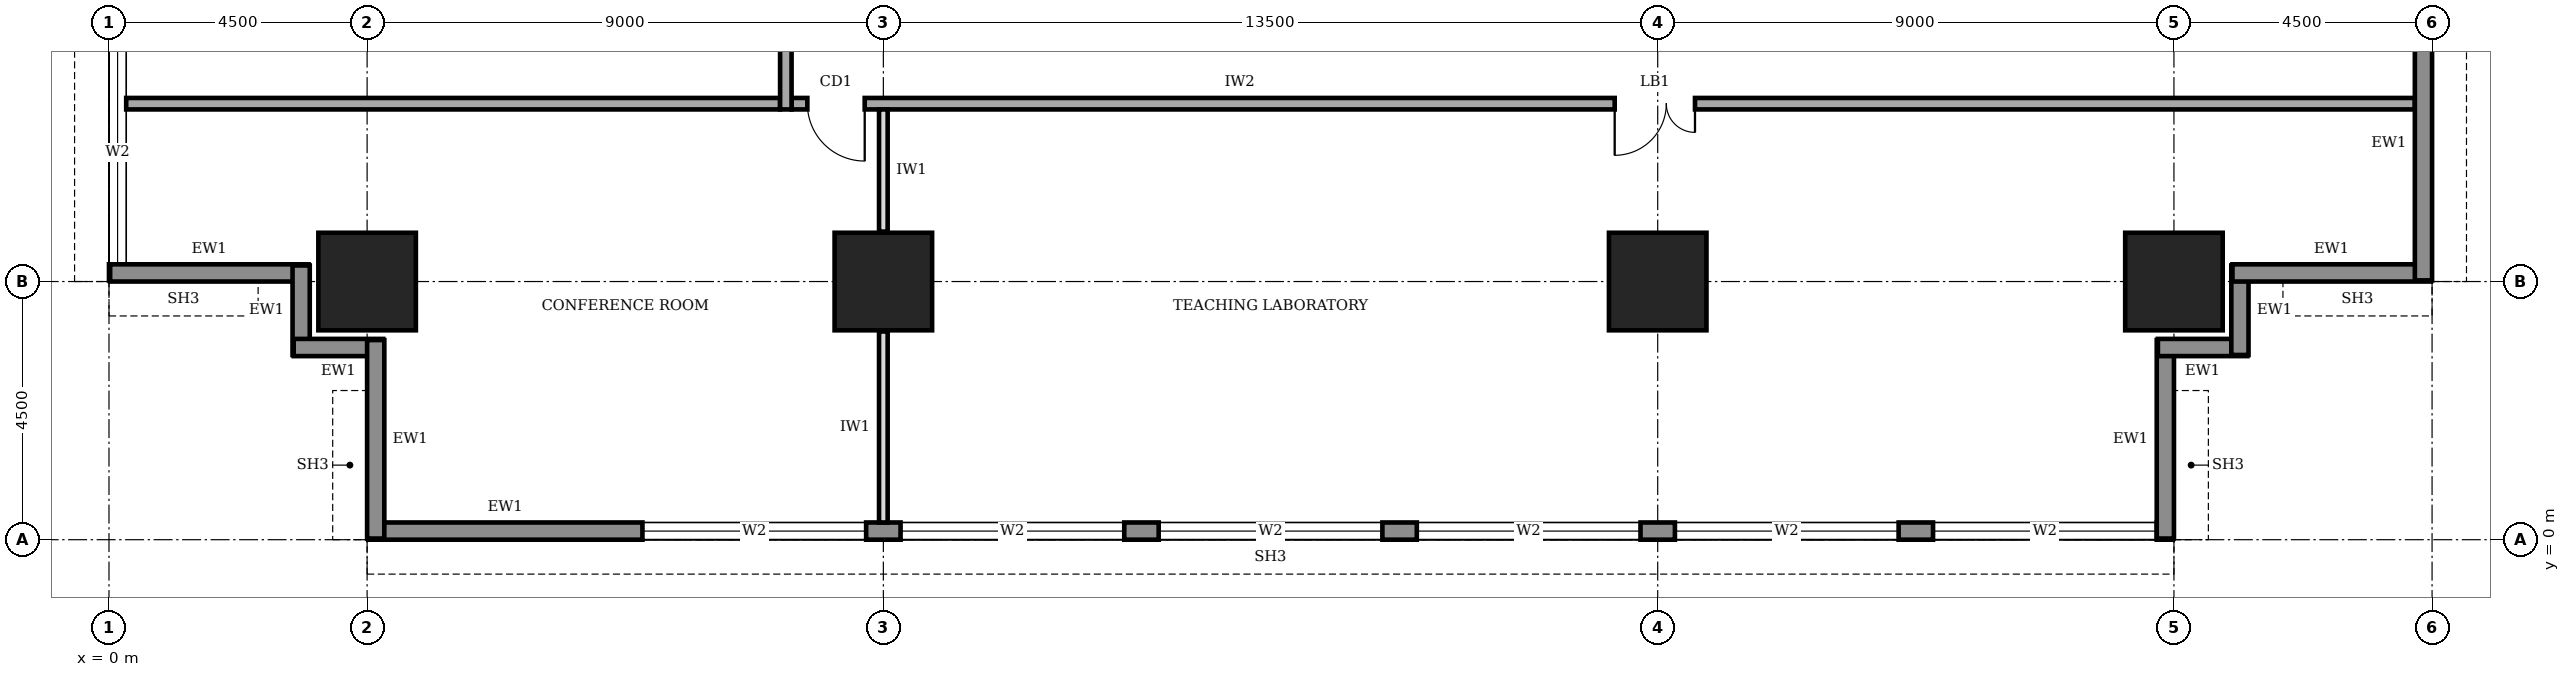
"""IFC4 building model, lengths in metres.
Left out: names, types, materials, properties, quantities, classifications, styles, units other than length and angle.
Written with IfcOpenShell. Run it as: python <this file> out.ifc"""

import sys

from ifc_helpers import new_model, si_unit, direction, frame, frame_2d, origin, origin_2d, place, context, subcontext, project, spatial, rectangle, extrude, element, fill, save


model = new_model("IFC4")
c1 = context("Model", 3, precision=1e-05, world=origin(), true_north=direction((0.0, 1.0)))
c2 = subcontext(c1, "Body", "Model", "MODEL_VIEW")
j1 = project(units=[si_unit("LENGTHUNIT", "METRE"), si_unit("PLANEANGLEUNIT", "RADIAN")], contexts=[c1])
p1 = place(None, origin())
s1 = spatial("IfcSite", under=j1, at=p1, CompositionType="ELEMENT")
p2 = place(p1, origin())
s2 = spatial("IfcBuilding", under=s1, at=p2, CompositionType="ELEMENT")
p3 = place(p2, frame((0.0, 0.0, 153.0)))
s3 = spatial("IfcBuildingStorey", under=s2, at=p3, CompositionType="ELEMENT", Elevation=153.0)
for number, where, z_axis, x_axis in (
    (1, (4.5, 4.5, 0.0), (0.0, 0.0, 1.0), (1.0, 0.0, 0.0)),
    (2, (13.5, 4.5, 0.0), (0.0, 0.0, 1.0), (1.0, 0.0, 0.0)),
    (3, (27.0, 4.5, 0.0), (0.0, 0.0, 1.0), (1.0, 0.0, 0.0)),
    (4, (36.0, 4.5, 0.0), (0.0, 0.0, 1.0), (1.0, 0.0, 0.0)),
):
    element("IfcColumn", number, at=place(p3, frame(where, z_axis=z_axis, x_axis=x_axis)), inside=s3, PredefinedType="COLUMN", context=c2, shape_type="SweptSolid", body=[
        extrude(rectangle(XDim=1.7, YDim=1.7, at=origin_2d()), origin(), (0.0, 0.0, 1.0), 4.0),
    ])
p4 = place(p3, frame((4.52, 0.15, 0.0), z_axis=(0.0, 0.0, 1.0), x_axis=(1.0, 0.0, 0.0)))
e5 = element("IfcWall", 5, at=p4, inside=s3, PredefinedType="STANDARD", context=c2, shape_type="SweptSolid", body=[
    extrude(rectangle(XDim=31.46, YDim=0.3, at=frame_2d((15.73, 0.0))), origin(), (0.0, 0.0, 1.0), 3.75),
])
p5 = place(p4, frame((4.78, 0.0, 0.6)))
e6 = element("IfcOpeningElement", 6, at=p5, cuts=e5, PredefinedType="OPENING", context=c2, shape_type="SweptSolid", body=[
    extrude(rectangle(XDim=3.9, YDim=2.6, at=frame_2d((1.95, 1.3))), frame((0.0, 0.16, 0.0), z_axis=(0.0, -1.0, 0.0), x_axis=(1.0, 0.0, 0.0)), (0.0, 0.0, 1.0), 0.32),
])
p6 = place(p4, frame((9.28, 0.0, 0.6)))
e7 = element("IfcOpeningElement", 7, at=p6, cuts=e5, PredefinedType="OPENING", context=c2, shape_type="SweptSolid", body=[
    extrude(rectangle(XDim=3.9, YDim=2.6, at=frame_2d((1.95, 1.3))), frame((0.0, 0.16, 0.0), z_axis=(0.0, -1.0, 0.0), x_axis=(1.0, 0.0, 0.0)), (0.0, 0.0, 1.0), 0.32),
])
p7 = place(p4, frame((13.78, 0.0, 0.6)))
e8 = element("IfcOpeningElement", 8, at=p7, cuts=e5, PredefinedType="OPENING", context=c2, shape_type="SweptSolid", body=[
    extrude(rectangle(XDim=3.9, YDim=2.6, at=frame_2d((1.95, 1.3))), frame((0.0, 0.16, 0.0), z_axis=(0.0, -1.0, 0.0), x_axis=(1.0, 0.0, 0.0)), (0.0, 0.0, 1.0), 0.32),
])
p8 = place(p4, frame((18.28, 0.0, 0.6)))
e9 = element("IfcOpeningElement", 9, at=p8, cuts=e5, PredefinedType="OPENING", context=c2, shape_type="SweptSolid", body=[
    extrude(rectangle(XDim=3.9, YDim=2.6, at=frame_2d((1.95, 1.3))), frame((0.0, 0.16, 0.0), z_axis=(0.0, -1.0, 0.0), x_axis=(1.0, 0.0, 0.0)), (0.0, 0.0, 1.0), 0.32),
])
p9 = place(p4, frame((22.78, 0.0, 0.6)))
e10 = element("IfcOpeningElement", 10, at=p9, cuts=e5, PredefinedType="OPENING", context=c2, shape_type="SweptSolid", body=[
    extrude(rectangle(XDim=3.9, YDim=2.6, at=frame_2d((1.95, 1.3))), frame((0.0, 0.16, 0.0), z_axis=(0.0, -1.0, 0.0), x_axis=(1.0, 0.0, 0.0)), (0.0, 0.0, 1.0), 0.32),
])
p10 = place(p4, frame((27.28, 0.0, 0.6)))
e11 = element("IfcOpeningElement", 11, at=p10, cuts=e5, PredefinedType="OPENING", context=c2, shape_type="SweptSolid", body=[
    extrude(rectangle(XDim=3.9, YDim=2.6, at=frame_2d((1.95, 1.3))), frame((0.0, 0.16, 0.0), z_axis=(0.0, -1.0, 0.0), x_axis=(1.0, 0.0, 0.0)), (0.0, 0.0, 1.0), 0.32),
])
p11 = place(p3, frame((35.85, 0.02, 0.0), z_axis=(0.0, 0.0, 1.0), x_axis=(0.0, 1.0, 0.0)))
e12 = element("IfcWall", 12, at=p11, inside=s3, PredefinedType="STANDARD", context=c2, shape_type="SweptSolid", body=[
    extrude(rectangle(XDim=3.46, YDim=0.3, at=frame_2d((1.73, 0.0))), origin(), (0.0, 0.0, 1.0), 2.85),
])
for number, where, z_axis, x_axis in (
    (13, (35.72, 3.35, 0.0), (0.0, 0.0, 1.0), (1.0, 0.0, 0.0)),
    (14, (37.15, 3.22, 0.0), (0.0, 0.0, 1.0), (0.0, 1.0, 0.0)),
):
    element("IfcWall", number, at=place(p3, frame(where, z_axis=z_axis, x_axis=x_axis)), inside=s3, PredefinedType="STANDARD", context=c2, shape_type="SweptSolid", body=[
        extrude(rectangle(XDim=1.56, YDim=0.3, at=frame_2d((0.78, 0.0))), origin(), (0.0, 0.0, 1.0), 3.75),
    ])
p12 = place(p3, frame((37.02, 4.65, 0.0), z_axis=(0.0, 0.0, 1.0), x_axis=(1.0, 0.0, 0.0)))
e15 = element("IfcWall", 15, at=p12, inside=s3, PredefinedType="STANDARD", context=c2, shape_type="SweptSolid", body=[
    extrude(rectangle(XDim=3.46, YDim=0.3, at=frame_2d((1.73, 0.0))), origin(), (0.0, 0.0, 1.0), 2.85),
])
p13 = place(p3, frame((40.35, 4.52, 0.0), z_axis=(0.0, 0.0, 1.0), x_axis=(0.0, 1.0, 0.0)))
e16 = element("IfcWall", 16, at=p13, inside=s3, PredefinedType="STANDARD", context=c2, shape_type="SweptSolid", body=[
    extrude(rectangle(XDim=31.46, YDim=0.3, at=frame_2d((15.73, 0.0))), origin(), (0.0, 0.0, 1.0), 3.75),
])
p14 = place(p13, frame((4.78, 0.0, 0.6)))
e17 = element("IfcOpeningElement", 17, at=p14, cuts=e16, PredefinedType="OPENING", context=c2, shape_type="SweptSolid", body=[
    extrude(rectangle(XDim=3.9, YDim=2.6, at=frame_2d((1.95, 1.3))), frame((0.0, 0.16, 0.0), z_axis=(0.0, -1.0, 0.0), x_axis=(1.0, 0.0, 0.0)), (0.0, 0.0, 1.0), 0.32),
])
p15 = place(p13, frame((9.28, 0.0, 0.6)))
e18 = element("IfcOpeningElement", 18, at=p15, cuts=e16, PredefinedType="OPENING", context=c2, shape_type="SweptSolid", body=[
    extrude(rectangle(XDim=3.9, YDim=2.6, at=frame_2d((1.95, 1.3))), frame((0.0, 0.16, 0.0), z_axis=(0.0, -1.0, 0.0), x_axis=(1.0, 0.0, 0.0)), (0.0, 0.0, 1.0), 0.32),
])
p16 = place(p13, frame((13.78, 0.0, 0.6)))
e19 = element("IfcOpeningElement", 19, at=p16, cuts=e16, PredefinedType="OPENING", context=c2, shape_type="SweptSolid", body=[
    extrude(rectangle(XDim=3.9, YDim=2.6, at=frame_2d((1.95, 1.3))), frame((0.0, 0.16, 0.0), z_axis=(0.0, -1.0, 0.0), x_axis=(1.0, 0.0, 0.0)), (0.0, 0.0, 1.0), 0.32),
])
p17 = place(p13, frame((18.28, 0.0, 0.6)))
e20 = element("IfcOpeningElement", 20, at=p17, cuts=e16, PredefinedType="OPENING", context=c2, shape_type="SweptSolid", body=[
    extrude(rectangle(XDim=3.9, YDim=2.6, at=frame_2d((1.95, 1.3))), frame((0.0, 0.16, 0.0), z_axis=(0.0, -1.0, 0.0), x_axis=(1.0, 0.0, 0.0)), (0.0, 0.0, 1.0), 0.32),
])
p18 = place(p13, frame((22.78, 0.0, 0.6)))
e21 = element("IfcOpeningElement", 21, at=p18, cuts=e16, PredefinedType="OPENING", context=c2, shape_type="SweptSolid", body=[
    extrude(rectangle(XDim=3.9, YDim=2.6, at=frame_2d((1.95, 1.3))), frame((0.0, 0.16, 0.0), z_axis=(0.0, -1.0, 0.0), x_axis=(1.0, 0.0, 0.0)), (0.0, 0.0, 1.0), 0.32),
])
p19 = place(p13, frame((27.28, 0.0, 0.6)))
e22 = element("IfcOpeningElement", 22, at=p19, cuts=e16, PredefinedType="OPENING", context=c2, shape_type="SweptSolid", body=[
    extrude(rectangle(XDim=3.9, YDim=2.6, at=frame_2d((1.95, 1.3))), frame((0.0, 0.16, 0.0), z_axis=(0.0, -1.0, 0.0), x_axis=(1.0, 0.0, 0.0)), (0.0, 0.0, 1.0), 0.32),
])
p20 = place(p3, frame((0.15, 35.98, 0.0), z_axis=(0.0, 0.0, 1.0), x_axis=(0.0, -1.0, 0.0)))
e23 = element("IfcWall", 23, at=p20, inside=s3, PredefinedType="STANDARD", context=c2, shape_type="SweptSolid", body=[
    extrude(rectangle(XDim=31.46, YDim=0.3, at=frame_2d((15.73, 0.0))), origin(), (0.0, 0.0, 1.0), 3.75),
])
p21 = place(p20, frame((27.28, 0.0, 0.6)))
e24 = element("IfcOpeningElement", 24, at=p21, cuts=e23, PredefinedType="OPENING", context=c2, shape_type="SweptSolid", body=[
    extrude(rectangle(XDim=3.9, YDim=2.6, at=frame_2d((1.95, 1.3))), frame((0.0, 0.16, 0.0), z_axis=(0.0, -1.0, 0.0), x_axis=(1.0, 0.0, 0.0)), (0.0, 0.0, 1.0), 0.32),
])
p22 = place(p20, frame((22.78, 0.0, 0.6)))
e25 = element("IfcOpeningElement", 25, at=p22, cuts=e23, PredefinedType="OPENING", context=c2, shape_type="SweptSolid", body=[
    extrude(rectangle(XDim=3.9, YDim=2.6, at=frame_2d((1.95, 1.3))), frame((0.0, 0.16, 0.0), z_axis=(0.0, -1.0, 0.0), x_axis=(1.0, 0.0, 0.0)), (0.0, 0.0, 1.0), 0.32),
])
p23 = place(p20, frame((18.28, 0.0, 0.6)))
e26 = element("IfcOpeningElement", 26, at=p23, cuts=e23, PredefinedType="OPENING", context=c2, shape_type="SweptSolid", body=[
    extrude(rectangle(XDim=3.9, YDim=2.6, at=frame_2d((1.95, 1.3))), frame((0.0, 0.16, 0.0), z_axis=(0.0, -1.0, 0.0), x_axis=(1.0, 0.0, 0.0)), (0.0, 0.0, 1.0), 0.32),
])
p24 = place(p20, frame((13.78, 0.0, 0.6)))
e27 = element("IfcOpeningElement", 27, at=p24, cuts=e23, PredefinedType="OPENING", context=c2, shape_type="SweptSolid", body=[
    extrude(rectangle(XDim=3.9, YDim=2.6, at=frame_2d((1.95, 1.3))), frame((0.0, 0.16, 0.0), z_axis=(0.0, -1.0, 0.0), x_axis=(1.0, 0.0, 0.0)), (0.0, 0.0, 1.0), 0.32),
])
p25 = place(p20, frame((9.28, 0.0, 0.6)))
e28 = element("IfcOpeningElement", 28, at=p25, cuts=e23, PredefinedType="OPENING", context=c2, shape_type="SweptSolid", body=[
    extrude(rectangle(XDim=3.9, YDim=2.6, at=frame_2d((1.95, 1.3))), frame((0.0, 0.16, 0.0), z_axis=(0.0, -1.0, 0.0), x_axis=(1.0, 0.0, 0.0)), (0.0, 0.0, 1.0), 0.32),
])
p26 = place(p20, frame((4.78, 0.0, 0.6)))
e29 = element("IfcOpeningElement", 29, at=p26, cuts=e23, PredefinedType="OPENING", context=c2, shape_type="SweptSolid", body=[
    extrude(rectangle(XDim=3.9, YDim=2.6, at=frame_2d((1.95, 1.3))), frame((0.0, 0.16, 0.0), z_axis=(0.0, -1.0, 0.0), x_axis=(1.0, 0.0, 0.0)), (0.0, 0.0, 1.0), 0.32),
])
p27 = place(p3, frame((0.02, 4.65, 0.0), z_axis=(0.0, 0.0, 1.0), x_axis=(1.0, 0.0, 0.0)))
e30 = element("IfcWall", 30, at=p27, inside=s3, PredefinedType="STANDARD", context=c2, shape_type="SweptSolid", body=[
    extrude(rectangle(XDim=3.46, YDim=0.3, at=frame_2d((1.73, 0.0))), origin(), (0.0, 0.0, 1.0), 2.85),
])
for number, where, z_axis, x_axis in (
    (31, (3.35, 4.78, 0.0), (0.0, 0.0, 1.0), (0.0, -1.0, 0.0)),
    (32, (3.22, 3.35, 0.0), (0.0, 0.0, 1.0), (1.0, 0.0, 0.0)),
):
    element("IfcWall", number, at=place(p3, frame(where, z_axis=z_axis, x_axis=x_axis)), inside=s3, PredefinedType="STANDARD", context=c2, shape_type="SweptSolid", body=[
        extrude(rectangle(XDim=1.56, YDim=0.3, at=frame_2d((0.78, 0.0))), origin(), (0.0, 0.0, 1.0), 3.75),
    ])
p28 = place(p3, frame((4.65, 3.48, 0.0), z_axis=(0.0, 0.0, 1.0), x_axis=(0.0, -1.0, 0.0)))
e33 = element("IfcWall", 33, at=p28, inside=s3, PredefinedType="STANDARD", context=c2, shape_type="SweptSolid", body=[
    extrude(rectangle(XDim=3.46, YDim=0.3, at=frame_2d((1.73, 0.0))), origin(), (0.0, 0.0, 1.0), 2.85),
])
p29 = place(p3, frame((11.9, 7.6, 0.0), z_axis=(0.0, 0.0, 1.0), x_axis=(1.0, 0.0, 0.0)))
e34 = element("IfcWall", 34, at=p29, inside=s3, PredefinedType="SOLIDWALL", context=c2, shape_type="SweptSolid", body=[
    extrude(rectangle(XDim=28.3, YDim=0.2, at=frame_2d((14.15, 0.0))), origin(), (0.0, 0.0, 1.0), 3.75),
])
p30 = place(p29, frame((0.275, 0.0, 0.0)))
e35 = element("IfcOpeningElement", 35, at=p30, cuts=e34, PredefinedType="OPENING", context=c2, shape_type="SweptSolid", body=[
    extrude(rectangle(XDim=1.0, YDim=2.1, at=frame_2d((0.5, 1.05))), frame((0.0, 0.11, 0.0), z_axis=(0.0, -1.0, 0.0), x_axis=(1.0, 0.0, 0.0)), (0.0, 0.0, 1.0), 0.22),
])
p31 = place(p29, frame((14.35, 0.0, 0.0)))
e36 = element("IfcOpeningElement", 36, at=p31, cuts=e34, PredefinedType="OPENING", context=c2, shape_type="SweptSolid", body=[
    extrude(rectangle(XDim=1.4, YDim=2.1, at=frame_2d((0.7, 1.05))), frame((0.0, 0.11, 0.0), z_axis=(0.0, -1.0, 0.0), x_axis=(1.0, 0.0, 0.0)), (0.0, 0.0, 1.0), 0.22),
])
p32 = place(p3, frame((11.8, 32.8, 0.0), z_axis=(0.0, 0.0, 1.0), x_axis=(0.0, -1.0, 0.0)))
e37 = element("IfcWall", 37, at=p32, inside=s3, PredefinedType="SOLIDWALL", context=c2, shape_type="SweptSolid", body=[
    extrude(rectangle(XDim=25.3, YDim=0.2, at=frame_2d((12.65, 0.0))), origin(), (0.0, 0.0, 1.0), 3.75),
])
p33 = place(p32, frame((21.8, 0.0, 0.0)))
e38 = element("IfcOpeningElement", 38, at=p33, cuts=e37, PredefinedType="OPENING", context=c2, shape_type="SweptSolid", body=[
    extrude(rectangle(XDim=1.0, YDim=2.1, at=frame_2d((0.5, 1.05))), frame((0.0, 0.11, 0.0), z_axis=(0.0, -1.0, 0.0), x_axis=(1.0, 0.0, 0.0)), (0.0, 0.0, 1.0), 0.22),
])
p34 = place(p32, frame((17.15, 0.0, 0.0)))
e39 = element("IfcOpeningElement", 39, at=p34, cuts=e37, PredefinedType="OPENING", context=c2, shape_type="SweptSolid", body=[
    extrude(rectangle(XDim=0.9, YDim=2.1, at=frame_2d((0.45, 1.05))), frame((0.0, 0.11, 0.0), z_axis=(0.0, -1.0, 0.0), x_axis=(1.0, 0.0, 0.0)), (0.0, 0.0, 1.0), 0.22),
])
p35 = place(p32, frame((12.35, 0.0, 0.0)))
e40 = element("IfcOpeningElement", 40, at=p35, cuts=e37, PredefinedType="OPENING", context=c2, shape_type="SweptSolid", body=[
    extrude(rectangle(XDim=0.9, YDim=2.1, at=frame_2d((0.45, 1.05))), frame((0.0, 0.11, 0.0), z_axis=(0.0, -1.0, 0.0), x_axis=(1.0, 0.0, 0.0)), (0.0, 0.0, 1.0), 0.22),
])
p36 = place(p32, frame((9.3, 0.0, 0.0)))
e41 = element("IfcOpeningElement", 41, at=p36, cuts=e37, PredefinedType="OPENING", context=c2, shape_type="SweptSolid", body=[
    extrude(rectangle(XDim=0.9, YDim=2.1, at=frame_2d((0.45, 1.05))), frame((0.0, 0.11, 0.0), z_axis=(0.0, -1.0, 0.0), x_axis=(1.0, 0.0, 0.0)), (0.0, 0.0, 1.0), 0.22),
])
p37 = place(p32, frame((6.3, 0.0, 0.0)))
e42 = element("IfcOpeningElement", 42, at=p37, cuts=e37, PredefinedType="OPENING", context=c2, shape_type="SweptSolid", body=[
    extrude(rectangle(XDim=1.0, YDim=2.1, at=frame_2d((0.5, 1.05))), frame((0.0, 0.11, 0.0), z_axis=(0.0, -1.0, 0.0), x_axis=(1.0, 0.0, 0.0)), (0.0, 0.0, 1.0), 0.22),
])
p38 = place(p32, frame((14.4, 0.0, 0.0)))
e43 = element("IfcOpeningElement", 43, at=p38, cuts=e37, PredefinedType="OPENING", context=c2, shape_type="SweptSolid", body=[
    extrude(rectangle(XDim=1.0, YDim=2.1, at=frame_2d((0.5, 1.05))), frame((0.0, 0.11, 0.0), z_axis=(0.0, -1.0, 0.0), x_axis=(1.0, 0.0, 0.0)), (0.0, 0.0, 1.0), 0.22),
])
p39 = place(p32, frame((2.3, 0.0, 0.0)))
e44 = element("IfcOpeningElement", 44, at=p39, cuts=e37, PredefinedType="OPENING", context=c2, shape_type="SweptSolid", body=[
    extrude(rectangle(XDim=1.0, YDim=2.1, at=frame_2d((0.5, 1.05))), frame((0.0, 0.11, 0.0), z_axis=(0.0, -1.0, 0.0), x_axis=(1.0, 0.0, 0.0)), (0.0, 0.0, 1.0), 0.22),
])
p40 = place(p3, frame((0.3, 7.6, 0.0), z_axis=(0.0, 0.0, 1.0), x_axis=(1.0, 0.0, 0.0)))
e45 = element("IfcWall", 45, at=p40, inside=s3, PredefinedType="SOLIDWALL", context=c2, shape_type="SweptSolid", body=[
    extrude(rectangle(XDim=11.4, YDim=0.2, at=frame_2d((5.7, 0.0))), origin(), (0.0, 0.0, 1.0), 3.75),
])
p41 = place(p3, frame((13.5, 0.3, 0.0), z_axis=(0.0, 0.0, 1.0), x_axis=(0.0, 1.0, 0.0)))
e46 = element("IfcWall", 46, at=p41, inside=s3, PredefinedType="PARTITIONING", context=c2, shape_type="SweptSolid", body=[
    extrude(rectangle(XDim=3.33, YDim=0.15, at=frame_2d((1.665, 0.0))), origin(), (0.0, 0.0, 1.0), 2.85),
])
p42 = place(p3, frame((13.5, 5.37, 0.0), z_axis=(0.0, 0.0, 1.0), x_axis=(0.0, 1.0, 0.0)))
e47 = element("IfcWall", 47, at=p42, inside=s3, PredefinedType="PARTITIONING", context=c2, shape_type="SweptSolid", body=[
    extrude(rectangle(XDim=2.13, YDim=0.15, at=frame_2d((1.065, 0.0))), origin(), (0.0, 0.0, 1.0), 2.85),
])
p43 = place(p5, origin())
e48 = element("IfcWindow", 48, at=p43, inside=s3, PartitioningType="SINGLE_PANEL", PredefinedType="WINDOW", context=c2, shape_type="SweptSolid", body=[
    extrude(rectangle(XDim=3.9, YDim=2.6, at=frame_2d((1.95, 1.3))), frame((0.0, 0.03, 0.0), z_axis=(0.0, -1.0, 0.0), x_axis=(1.0, 0.0, 0.0)), (0.0, 0.0, 1.0), 0.06),
])
fill(e6, e48)
p44 = place(p6, origin())
e49 = element("IfcWindow", 49, at=p44, inside=s3, PartitioningType="SINGLE_PANEL", PredefinedType="WINDOW", context=c2, shape_type="SweptSolid", body=[
    extrude(rectangle(XDim=3.9, YDim=2.6, at=frame_2d((1.95, 1.3))), frame((0.0, 0.03, 0.0), z_axis=(0.0, -1.0, 0.0), x_axis=(1.0, 0.0, 0.0)), (0.0, 0.0, 1.0), 0.06),
])
fill(e7, e49)
p45 = place(p7, origin())
e50 = element("IfcWindow", 50, at=p45, inside=s3, PartitioningType="SINGLE_PANEL", PredefinedType="WINDOW", context=c2, shape_type="SweptSolid", body=[
    extrude(rectangle(XDim=3.9, YDim=2.6, at=frame_2d((1.95, 1.3))), frame((0.0, 0.03, 0.0), z_axis=(0.0, -1.0, 0.0), x_axis=(1.0, 0.0, 0.0)), (0.0, 0.0, 1.0), 0.06),
])
fill(e8, e50)
p46 = place(p8, origin())
e51 = element("IfcWindow", 51, at=p46, inside=s3, PartitioningType="SINGLE_PANEL", PredefinedType="WINDOW", context=c2, shape_type="SweptSolid", body=[
    extrude(rectangle(XDim=3.9, YDim=2.6, at=frame_2d((1.95, 1.3))), frame((0.0, 0.03, 0.0), z_axis=(0.0, -1.0, 0.0), x_axis=(1.0, 0.0, 0.0)), (0.0, 0.0, 1.0), 0.06),
])
fill(e9, e51)
p47 = place(p9, origin())
e52 = element("IfcWindow", 52, at=p47, inside=s3, PartitioningType="SINGLE_PANEL", PredefinedType="WINDOW", context=c2, shape_type="SweptSolid", body=[
    extrude(rectangle(XDim=3.9, YDim=2.6, at=frame_2d((1.95, 1.3))), frame((0.0, 0.03, 0.0), z_axis=(0.0, -1.0, 0.0), x_axis=(1.0, 0.0, 0.0)), (0.0, 0.0, 1.0), 0.06),
])
fill(e10, e52)
p48 = place(p10, origin())
e53 = element("IfcWindow", 53, at=p48, inside=s3, PartitioningType="SINGLE_PANEL", PredefinedType="WINDOW", context=c2, shape_type="SweptSolid", body=[
    extrude(rectangle(XDim=3.9, YDim=2.6, at=frame_2d((1.95, 1.3))), frame((0.0, 0.03, 0.0), z_axis=(0.0, -1.0, 0.0), x_axis=(1.0, 0.0, 0.0)), (0.0, 0.0, 1.0), 0.06),
])
fill(e11, e53)
p49 = place(p21, origin())
e54 = element("IfcWindow", 54, at=p49, inside=s3, PartitioningType="SINGLE_PANEL", PredefinedType="WINDOW", context=c2, shape_type="SweptSolid", body=[
    extrude(rectangle(XDim=3.9, YDim=2.6, at=frame_2d((1.95, 1.3))), frame((0.0, 0.03, 0.0), z_axis=(0.0, -1.0, 0.0), x_axis=(1.0, 0.0, 0.0)), (0.0, 0.0, 1.0), 0.06),
])
fill(e24, e54)
p50 = place(p30, frame((1.0, 0.0, 0.0), z_axis=(0.0, 0.0, 1.0), x_axis=(-1.0, 0.0, 0.0)))
e55 = element("IfcDoor", 55, at=p50, inside=s3, OperationType="SINGLE_SWING_LEFT", PredefinedType="DOOR", context=c2, shape_type="SweptSolid", body=[
    extrude(rectangle(XDim=1.0, YDim=2.1, at=frame_2d((0.5, 1.05))), frame((0.0, 0.025, 0.0), z_axis=(0.0, -1.0, 0.0), x_axis=(1.0, 0.0, 0.0)), (0.0, 0.0, 1.0), 0.05),
])
fill(e35, e55)
p51 = place(p31, frame((1.4, 0.0, 0.0), z_axis=(0.0, 0.0, 1.0), x_axis=(-1.0, 0.0, 0.0)))
e56 = element("IfcDoor", 56, at=p51, inside=s3, OperationType="DOUBLE_DOOR_SINGLE_SWING", PredefinedType="DOOR", context=c2, shape_type="SweptSolid", body=[
    extrude(rectangle(XDim=1.4, YDim=2.1, at=frame_2d((0.7, 1.05))), frame((0.0, 0.025, 0.0), z_axis=(0.0, -1.0, 0.0), x_axis=(1.0, 0.0, 0.0)), (0.0, 0.0, 1.0), 0.05),
])
fill(e36, e56)
save(model, sys.argv[1])
